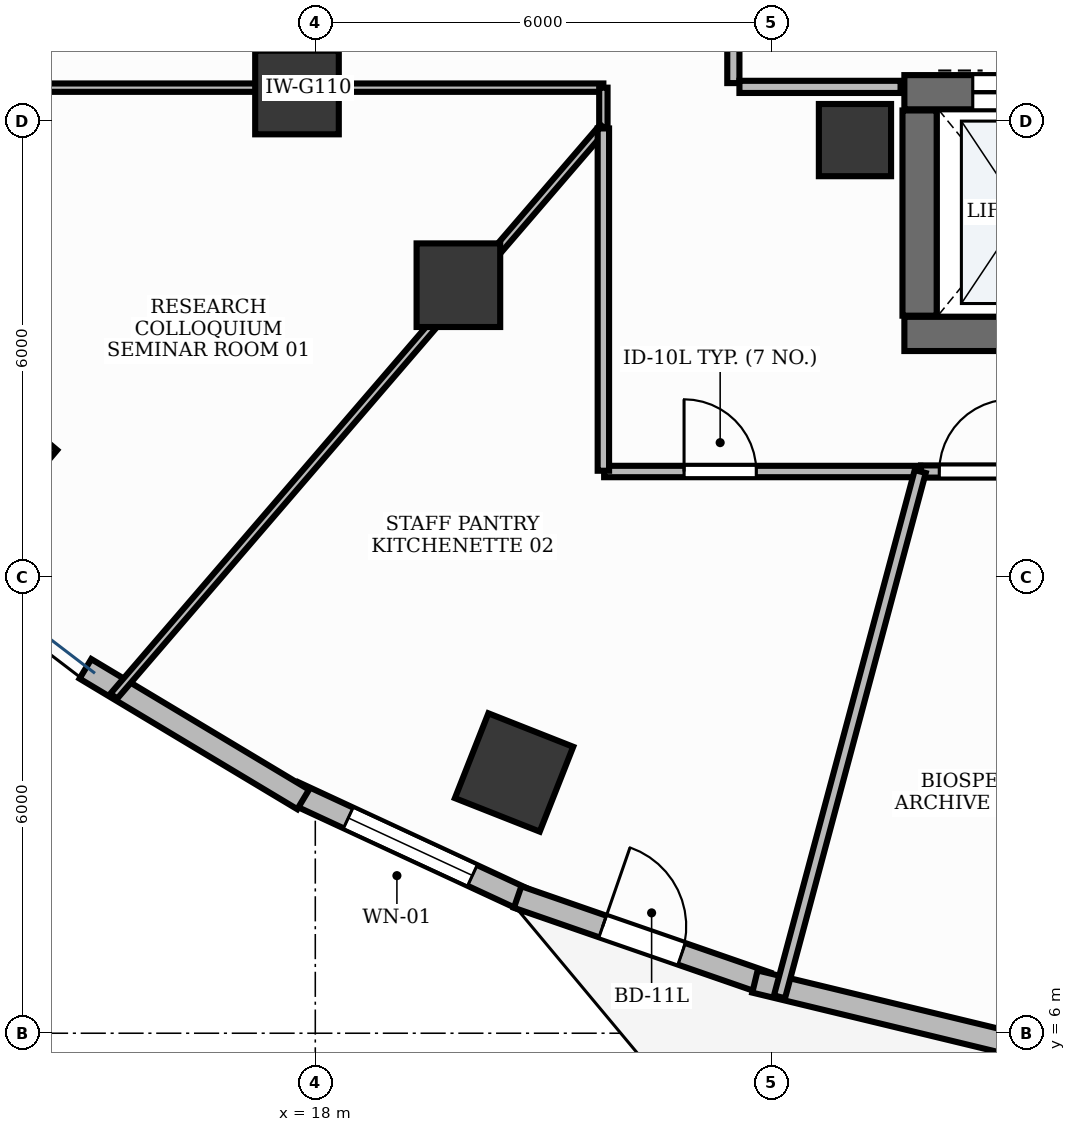
"""IFC4 building model, lengths in metres.
Left out: names, types, materials, properties, quantities, classifications, styles, units other than length and angle.
Written with IfcOpenShell. Run it as: python <this file> out.ifc"""

import sys

from ifc_helpers import new_model, si_unit, direction, frame, frame_2d, origin, origin_2d, place, context, subcontext, project, spatial, rectangle, extrude, element, fill, save


model = new_model("IFC4")
c1 = context("Model", 3, precision=1e-05, world=origin(), true_north=direction((0.0, 1.0)))
c2 = subcontext(c1, "Body", "Model", "MODEL_VIEW")
j1 = project(units=[si_unit("LENGTHUNIT", "METRE"), si_unit("PLANEANGLEUNIT", "RADIAN")], contexts=[c1])
p1 = place(None, origin())
s1 = spatial("IfcSite", under=j1, at=p1, CompositionType="ELEMENT")
p2 = place(p1, origin())
s2 = spatial("IfcBuilding", under=s1, at=p2, CompositionType="ELEMENT")
p3 = place(p2, frame((0.0, 0.0, 111.0)))
s3 = spatial("IfcBuildingStorey", under=s2, at=p3, CompositionType="ELEMENT", Elevation=111.0)
p4 = place(p3, frame((25.75, 15.2, 0.0), z_axis=(0.0, 0.0, 1.0), x_axis=(1.0, 0.0, 0.0)))
e1 = element("IfcWall", 1, at=p4, inside=s3, PredefinedType="SHEAR", context=c2, shape_type="SweptSolid", body=[
    extrude(rectangle(XDim=3.1, YDim=0.45, at=frame_2d((1.55, 0.0))), origin(), (0.0, 0.0, 1.0), 3.9),
])
p5 = place(p3, frame((25.75, 18.38, 0.0), z_axis=(0.0, 0.0, 1.0), x_axis=(1.0, 0.0, 0.0)))
e2 = element("IfcWall", 2, at=p5, inside=s3, PredefinedType="SHEAR", context=c2, shape_type="SweptSolid", body=[
    extrude(rectangle(XDim=3.1, YDim=0.45, at=frame_2d((1.55, 0.0))), origin(), (0.0, 0.0, 1.0), 3.9),
])
p6 = place(p5, frame((0.9, 0.0, 0.0)))
e3 = element("IfcOpeningElement", 3, at=p6, cuts=e2, PredefinedType="OPENING", context=c2, shape_type="SweptSolid", body=[
    extrude(rectangle(XDim=1.3, YDim=2.2, at=frame_2d((0.65, 1.1))), frame((0.0, 0.24, 0.0), z_axis=(0.0, -1.0, 0.0), x_axis=(1.0, 0.0, 0.0)), (0.0, 0.0, 1.0), 0.48),
])
p7 = place(p3, frame((25.95, 15.44, 0.0), z_axis=(0.0, 0.0, 1.0), x_axis=(0.0, 1.0, 0.0)))
e4 = element("IfcWall", 4, at=p7, inside=s3, PredefinedType="SHEAR", context=c2, shape_type="SweptSolid", body=[
    extrude(rectangle(XDim=2.7, YDim=0.45, at=frame_2d((1.35, 0.0))), origin(), (0.0, 0.0, 1.0), 3.9),
])
p8 = place(p3, frame((25.1, 17.75, -0.0), z_axis=(0.0, 0.0, 1.0), x_axis=(1.0, 0.0, 0.0)))
e5 = element("IfcColumn", 5, at=p8, inside=s3, PredefinedType="PILASTER", context=c2, shape_type="SweptSolid", body=[
    extrude(rectangle(XDim=0.95, YDim=0.95, at=origin_2d()), origin(), (0.0, 0.0, 1.0), 3.901),
])
p9 = place(p3, frame((17.759, 18.376, -0.0), z_axis=(0.0, 0.0, 1.0), x_axis=(1.0, 0.0, 0.0)))
e6 = element("IfcColumn", 6, at=p9, inside=s3, PredefinedType="COLUMN", context=c2, shape_type="SweptSolid", body=[
    extrude(rectangle(XDim=1.1, YDim=1.1, at=origin_2d()), origin(), (0.0, 0.0, 1.0), 3.901),
])
p10 = place(p3, frame((13.758, 13.6, -0.0), z_axis=(0.0, 0.0, 1.0), x_axis=(-0.764246456939, 0.644924300253, 0.0)))
e7 = element("IfcColumn", 7, at=p10, inside=s3, PredefinedType="COLUMN", context=c2, shape_type="SweptSolid", body=[
    extrude(rectangle(XDim=1.2, YDim=1.2, at=origin_2d()), origin(), (0.0, 0.0, 1.0), 3.901),
])
p11 = place(p3, frame((19.883, 15.841, -0.0), z_axis=(0.0, 0.0, 1.0), x_axis=(1.0, 0.0, 0.0)))
e8 = element("IfcColumn", 8, at=p11, inside=s3, PredefinedType="COLUMN", context=c2, shape_type="SweptSolid", body=[
    extrude(rectangle(XDim=1.1, YDim=1.1, at=origin_2d()), origin(), (0.0, 0.0, 1.0), 3.901),
])
p12 = place(p3, frame((20.615, 9.431, -0.0), z_axis=(0.0, 0.0, 1.0), x_axis=(-0.930225540858, 0.366988341962, 0.0)))
e9 = element("IfcColumn", 9, at=p12, inside=s3, PredefinedType="COLUMN", context=c2, shape_type="SweptSolid", body=[
    extrude(rectangle(XDim=1.2, YDim=1.2, at=origin_2d()), origin(), (0.0, 0.0, 1.0), 3.901),
])
p13 = place(p3, frame((17.713, 9.167, 0.0), z_axis=(0.0, 0.0, 1.0), x_axis=(0.907218110188, -0.42066055264, 0.0)))
e10 = element("IfcWall", 10, at=p13, inside=s3, PredefinedType="STANDARD", context=c2, shape_type="SweptSolid", body=[
    extrude(rectangle(XDim=3.39, YDim=0.3, at=frame_2d((1.695, 0.0))), origin(), (0.0, 0.0, 1.0), 3.9),
])
p14 = place(p13, frame((0.795, 0.0, 0.9)))
e11 = element("IfcOpeningElement", 11, at=p14, cuts=e10, PredefinedType="OPENING", context=c2, shape_type="SweptSolid", body=[
    extrude(rectangle(XDim=1.8, YDim=2.1, at=frame_2d((0.9, 1.05))), frame((0.0, 0.165, 0.0), z_axis=(0.0, -1.0, 0.0), x_axis=(1.0, 0.0, 0.0)), (0.0, 0.0, 1.0), 0.33),
])
p15 = place(p3, frame((20.662, 7.792, 0.0), z_axis=(0.0, 0.0, 1.0), x_axis=(0.944878029854, -0.3274225232, 0.0)))
e12 = element("IfcWall", 12, at=p15, inside=s3, PredefinedType="STANDARD", context=c2, shape_type="SweptSolid", body=[
    extrude(rectangle(XDim=3.467, YDim=0.3, at=frame_2d((1.734, 0.0))), origin(), (0.0, 0.0, 1.0), 3.9),
])
p16 = place(p15, frame((1.184, 0.0, 0.0)))
e13 = element("IfcOpeningElement", 13, at=p16, cuts=e12, PredefinedType="OPENING", context=c2, shape_type="SweptSolid", body=[
    extrude(rectangle(XDim=1.1, YDim=2.15, at=frame_2d((0.55, 1.075))), frame((0.0, 0.165, 0.0), z_axis=(0.0, -1.0, 0.0), x_axis=(1.0, 0.0, 0.0)), (0.0, 0.0, 1.0), 0.33),
])
p17 = place(p3, frame((14.976, 10.794, 0.0), z_axis=(0.0, 0.0, 1.0), x_axis=(0.857602536704, -0.514313026316, 0.0)))
e14 = element("IfcWall", 14, at=p17, inside=s3, PredefinedType="STANDARD", context=c2, shape_type="SweptSolid", body=[
    extrude(rectangle(XDim=3.34, YDim=0.3, at=frame_2d((1.67, 0.0))), origin(), (0.0, 0.0, 1.0), 3.9),
])
p18 = place(p3, frame((23.784, 6.68, 0.0), z_axis=(0.0, 0.0, 1.0), x_axis=(0.972043452321, -0.234801036625, 0.0)))
e15 = element("IfcWall", 15, at=p18, inside=s3, PredefinedType="STANDARD", context=c2, shape_type="SweptSolid", body=[
    extrude(rectangle(XDim=3.569, YDim=0.3, at=frame_2d((1.784, 0.0))), origin(), (0.0, 0.0, 1.0), 3.9),
])
p19 = place(p3, frame((23.5, 18.5, 0.0), z_axis=(0.0, 0.0, 1.0), x_axis=(0.0, 1.0, 0.0)))
e16 = element("IfcWall", 16, at=p19, inside=s3, PredefinedType="PARTITIONING", context=c2, shape_type="SweptSolid", body=[
    extrude(rectangle(XDim=3.4, YDim=0.16, at=frame_2d((1.7, 0.0))), origin(), (0.0, 0.0, 1.0), 2.91),
])
p20 = place(p19, frame((1.175, 0.0, 0.0)))
e17 = element("IfcOpeningElement", 17, at=p20, cuts=e16, PredefinedType="OPENING", context=c2, shape_type="SweptSolid", body=[
    extrude(rectangle(XDim=1.05, YDim=2.15, at=frame_2d((0.525, 1.075))), frame((0.0, 0.095, 0.0), z_axis=(0.0, -1.0, 0.0), x_axis=(1.0, 0.0, 0.0)), (0.0, 0.0, 1.0), 0.19),
])
p21 = place(p3, frame((23.58, 18.45, 0.0), z_axis=(0.0, 0.0, 1.0), x_axis=(1.0, 0.0, 0.0)))
e18 = element("IfcWall", 18, at=p21, inside=s3, PredefinedType="PARTITIONING", context=c2, shape_type="SweptSolid", body=[
    extrude(rectangle(XDim=2.12, YDim=0.16, at=frame_2d((1.06, 0.0))), origin(), (0.0, 0.0, 1.0), 2.91),
])
p22 = place(p3, frame((11.59, 18.44, 0.0), z_axis=(0.0, 0.0, 1.0), x_axis=(1.0, 0.0, 0.0)))
e19 = element("IfcWall", 19, at=p22, inside=s3, PredefinedType="MOVABLE", context=c2, shape_type="SweptSolid", body=[
    extrude(rectangle(XDim=10.2, YDim=0.11, at=frame_2d((5.1, 0.0))), origin(), (0.0, 0.0, 1.0), 2.91),
])
p23 = place(p22, frame((1.27, 0.0, 0.0)))
e20 = element("IfcOpeningElement", 20, at=p23, cuts=e19, PredefinedType="OPENING", context=c2, shape_type="SweptSolid", body=[
    extrude(rectangle(XDim=0.95, YDim=2.15, at=frame_2d((0.475, 1.075))), frame((0.0, 0.07, 0.0), z_axis=(0.0, -1.0, 0.0), x_axis=(1.0, 0.0, 0.0)), (0.0, 0.0, 1.0), 0.14),
])
p24 = place(p3, frame((21.8, 13.39, 0.0), z_axis=(0.0, 0.0, 1.0), x_axis=(1.0, 0.0, 0.0)))
e21 = element("IfcWall", 21, at=p24, inside=s3, PredefinedType="PARTITIONING", context=c2, shape_type="SweptSolid", body=[
    extrude(rectangle(XDim=4.159, YDim=0.15, at=frame_2d((2.079, 0.0))), origin(), (0.0, 0.0, 1.0), 2.91),
])
p25 = place(p24, frame((1.052, 0.0, 0.0)))
e22 = element("IfcOpeningElement", 22, at=p25, cuts=e21, PredefinedType="OPENING", context=c2, shape_type="SweptSolid", body=[
    extrude(rectangle(XDim=0.95, YDim=2.15, at=frame_2d((0.475, 1.075))), frame((0.0, 0.09, 0.0), z_axis=(0.0, -1.0, 0.0), x_axis=(1.0, 0.0, 0.0)), (0.0, 0.0, 1.0), 0.18),
])
p26 = place(p3, frame((25.969, 13.39, 0.0), z_axis=(0.0, 0.0, 1.0), x_axis=(1.0, 0.0, 0.0)))
e23 = element("IfcWall", 23, at=p26, inside=s3, PredefinedType="PARTITIONING", context=c2, shape_type="SweptSolid", body=[
    extrude(rectangle(XDim=2.531, YDim=0.16, at=frame_2d((1.266, 0.0))), origin(), (0.0, 0.0, 1.0), 2.91),
])
p27 = place(p26, frame((0.24, 0.0, 0.0)))
e24 = element("IfcOpeningElement", 24, at=p27, cuts=e23, PredefinedType="OPENING", context=c2, shape_type="SweptSolid", body=[
    extrude(rectangle(XDim=0.95, YDim=2.15, at=frame_2d((0.475, 1.075))), frame((0.0, 0.095, 0.0), z_axis=(0.0, -1.0, 0.0), x_axis=(1.0, 0.0, 0.0)), (0.0, 0.0, 1.0), 0.19),
])
p28 = place(p3, frame((21.79, 18.44, 0.0), z_axis=(0.0, 0.0, 1.0), x_axis=(0.0, -1.0, 0.0)))
e25 = element("IfcWall", 25, at=p28, inside=s3, PredefinedType="MOVABLE", context=c2, shape_type="SweptSolid", body=[
    extrude(rectangle(XDim=0.521, YDim=0.11, at=frame_2d((0.261, 0.0))), origin(), (0.0, 0.0, 1.0), 2.91),
])
p29 = place(p3, frame((21.79, 17.919, 0.0), z_axis=(0.0, 0.0, 1.0), x_axis=(-0.652278586957, -0.757979316999, 0.0)))
e26 = element("IfcWall", 26, at=p29, inside=s3, PredefinedType="MOVABLE", context=c2, shape_type="SweptSolid", body=[
    extrude(rectangle(XDim=9.874, YDim=0.11, at=frame_2d((4.937, 0.0))), origin(), (0.0, 0.0, 1.0), 2.91),
])
p30 = place(p3, frame((21.79, 17.903, 0.0), z_axis=(0.0, 0.0, 1.0), x_axis=(0.0, -1.0, 0.0)))
e27 = element("IfcWall", 27, at=p30, inside=s3, PredefinedType="PARTITIONING", context=c2, shape_type="SweptSolid", body=[
    extrude(rectangle(XDim=4.503, YDim=0.15, at=frame_2d((2.252, 0.0))), origin(), (0.0, 0.0, 1.0), 2.91),
])
p31 = place(p3, frame((25.959, 13.39, 0.0), z_axis=(0.0, 0.0, 1.0), x_axis=(-0.258815678752, -0.965926728294, 0.0)))
e28 = element("IfcWall", 28, at=p31, inside=s3, PredefinedType="PARTITIONING", context=c2, shape_type="SweptSolid", body=[
    extrude(rectangle(XDim=7.155, YDim=0.15, at=frame_2d((3.578, 0.0))), origin(), (0.0, 0.0, 1.0), 2.91),
])
p32 = place(p14, origin())
e29 = element("IfcWindow", 29, at=p32, inside=s3, PartitioningType="SINGLE_PANEL", PredefinedType="WINDOW", context=c2, shape_type="SweptSolid", body=[
    extrude(rectangle(XDim=1.8, YDim=2.1, at=frame_2d((0.9, 1.05))), frame((0.0, 0.03, 0.0), z_axis=(0.0, -1.0, 0.0), x_axis=(1.0, 0.0, 0.0)), (0.0, 0.0, 1.0), 0.06),
])
fill(e11, e29)
p33 = place(p16, origin())
e30 = element("IfcDoor", 30, at=p33, inside=s3, OperationType="SINGLE_SWING_LEFT", PredefinedType="DOOR", context=c2, shape_type="SweptSolid", body=[
    extrude(rectangle(XDim=1.1, YDim=2.15, at=frame_2d((0.55, 1.075))), frame((0.0, 0.025, 0.0), z_axis=(0.0, -1.0, 0.0), x_axis=(1.0, 0.0, 0.0)), (0.0, 0.0, 1.0), 0.05),
])
fill(e13, e30)
p34 = place(p6, origin())
e31 = element("IfcDoor", 31, at=p34, inside=s3, OperationType="DOUBLE_DOOR_SLIDING", PredefinedType="DOOR", context=c2, shape_type="SweptSolid", body=[
    extrude(rectangle(XDim=1.3, YDim=2.2, at=frame_2d((0.65, 1.1))), frame((0.0, 0.025, 0.0), z_axis=(0.0, -1.0, 0.0), x_axis=(1.0, 0.0, 0.0)), (0.0, 0.0, 1.0), 0.05),
])
fill(e3, e31)
p35 = place(p25, origin())
e32 = element("IfcDoor", 32, at=p35, inside=s3, OperationType="SINGLE_SWING_LEFT", PredefinedType="DOOR", context=c2, shape_type="SweptSolid", body=[
    extrude(rectangle(XDim=0.95, YDim=2.15, at=frame_2d((0.475, 1.075))), frame((0.0, 0.025, 0.0), z_axis=(0.0, -1.0, 0.0), x_axis=(1.0, 0.0, 0.0)), (0.0, 0.0, 1.0), 0.05),
])
fill(e22, e32)
p36 = place(p27, origin())
e33 = element("IfcDoor", 33, at=p36, inside=s3, OperationType="SINGLE_SWING_RIGHT", PredefinedType="DOOR", context=c2, shape_type="SweptSolid", body=[
    extrude(rectangle(XDim=0.95, YDim=2.15, at=frame_2d((0.475, 1.075))), frame((0.0, 0.025, 0.0), z_axis=(0.0, -1.0, 0.0), x_axis=(1.0, 0.0, 0.0)), (0.0, 0.0, 1.0), 0.05),
])
fill(e24, e33)
save(model, sys.argv[1])
